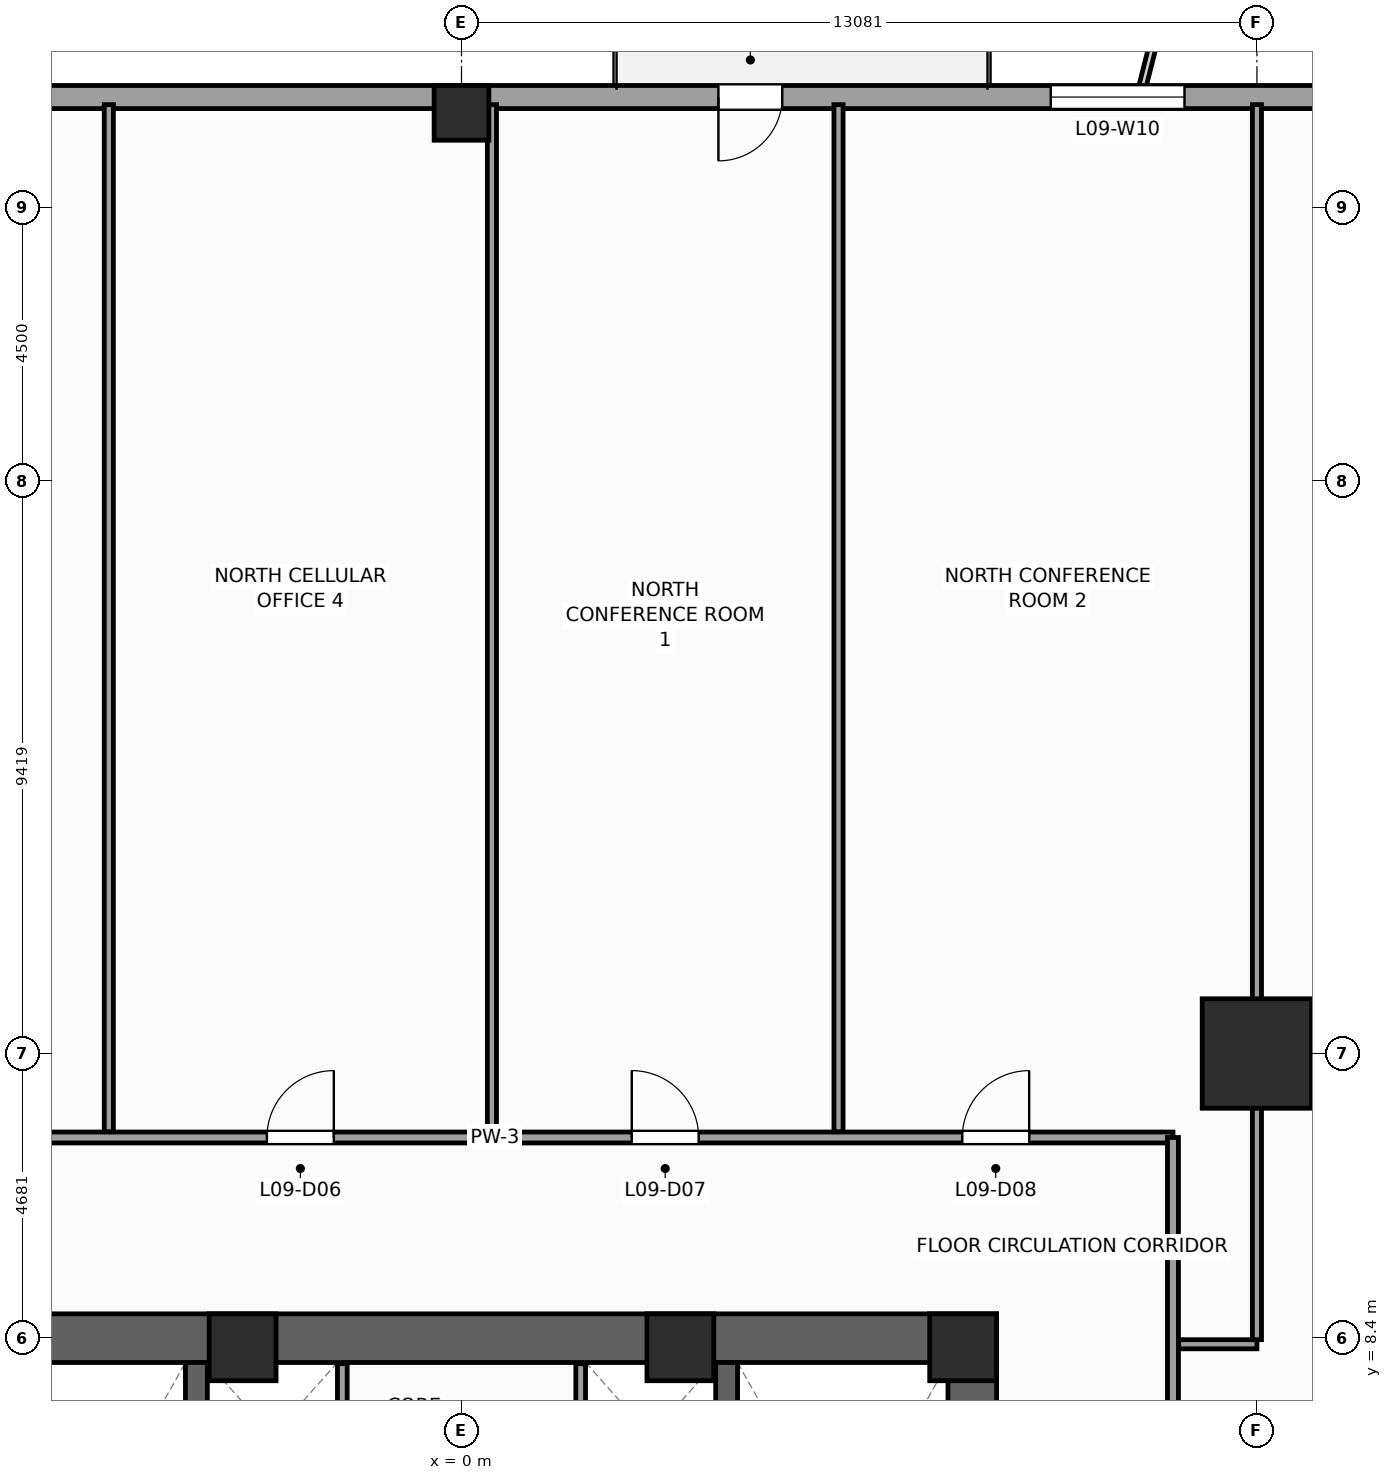
"""IFC4 building model, lengths in metres.
Left out: names, types, materials, properties, quantities, classifications, styles, units other than length and angle.
Written with IfcOpenShell. Run it as: python <this file> out.ifc"""

import sys

from ifc_helpers import new_model, si_unit, direction, frame, frame_2d, origin, origin_2d, place, context, subcontext, project, spatial, rectangle, extrude, source, transform, mapped, element, fill, save


model = new_model("IFC4")
c1 = context("Model", 3, precision=1e-05, world=origin(), true_north=direction((0.0, 1.0)))
c2 = subcontext(c1, "Body", "Model", "MODEL_VIEW")
j1 = project(units=[si_unit("LENGTHUNIT", "METRE"), si_unit("PLANEANGLEUNIT", "RADIAN")], contexts=[c1])
p1 = place(None, origin())
s1 = spatial("IfcSite", under=j1, at=p1, CompositionType="ELEMENT")
p2 = place(p1, origin())
s2 = spatial("IfcBuilding", under=s1, at=p2, CompositionType="ELEMENT")
p3 = place(p2, frame((0.0, 0.0, 42.0)))
s3 = spatial("IfcBuildingStorey", under=s2, at=p3, CompositionType="ELEMENT", Elevation=42.0)
p4 = place(p3, frame((-8.8, 8.4, 0.0), z_axis=(0.0, 0.0, 1.0), x_axis=(1.0, 0.0, 0.0)))
e1 = element("IfcWall", 1, at=p4, inside=s3, PredefinedType="SHEAR", context=c2, shape_type="SweptSolid", body=[
    extrude(rectangle(XDim=17.6, YDim=0.8, at=frame_2d((8.8, 0.0))), origin(), (0.0, 0.0, 1.0), 4.0),
])
p5 = place(p3, frame((8.4, -8.0, 0.0), z_axis=(0.0, 0.0, 1.0), x_axis=(0.0, 1.0, 0.0)))
e2 = element("IfcWall", 2, at=p5, inside=s3, PredefinedType="SHEAR", context=c2, shape_type="SweptSolid", body=[
    extrude(rectangle(XDim=16.0, YDim=0.8, at=frame_2d((8.0, 0.0))), origin(), (0.0, 0.0, 1.0), 4.0),
])
p6 = place(p5, frame((4.69, 0.0, 0.0)))
e3 = element("IfcOpeningElement", 3, at=p6, cuts=e2, PredefinedType="OPENING", context=c2, shape_type="SweptSolid", body=[
    extrude(rectangle(XDim=1.3, YDim=2.2, at=frame_2d((0.65, 1.1))), frame((0.0, 0.41, 0.0), z_axis=(0.0, -1.0, 0.0), x_axis=(1.0, 0.0, 0.0)), (0.0, 0.0, 1.0), 0.82),
])
for number, where, z_axis, x_axis in (
    (4, (-4.36, -8.0, 0.0), (0.0, 0.0, 1.0), (0.0, 1.0, 0.0)),
    (5, (4.36, -8.0, 0.0), (0.0, 0.0, 1.0), (0.0, 1.0, 0.0)),
):
    element("IfcWall", number, at=place(p3, frame(where, z_axis=z_axis, x_axis=x_axis)), inside=s3, PredefinedType="SHEAR", context=c2, shape_type="SweptSolid", body=[
        extrude(rectangle(XDim=16.0, YDim=0.36, at=frame_2d((8.0, 0.0))), origin(), (0.0, 0.0, 1.0), 4.0),
    ])
m1 = source(origin(), c2, "Body", "SweptSolid", [
    extrude(rectangle(XDim=1.1, YDim=1.1, at=origin_2d()), origin(), (0.0, 0.0, 1.0), 4.0),
])
for number, where, z_axis, x_axis in (
    (6, (8.25, 8.25, 0.0), (0.0, 0.0, 1.0), (1.0, 0.0, 0.0)),
    (7, (-3.6, 8.25, 0.0), (0.0, 0.0, 1.0), (1.0, 0.0, 0.0)),
    (8, (3.6, 8.25, 0.0), (0.0, 0.0, 1.0), (1.0, 0.0, 0.0)),
):
    element("IfcColumn", number, at=place(p3, frame(where, z_axis=z_axis, x_axis=x_axis)), inside=s3, PredefinedType="PILASTER", context=c2, shape_type="MappedRepresentation", body=[
        mapped(m1, transform((0.0, 0.0, 0.0), scale=1.0)),
    ])
m2 = source(origin(), c2, "Body", "SweptSolid", [
    extrude(rectangle(XDim=1.8, YDim=1.8, at=origin_2d()), origin(), (0.0, 0.0, 1.0), 4.0),
])
p7 = place(p3, frame((13.081, 13.081, 0.0), z_axis=(0.0, 0.0, 1.0), x_axis=(1.0, 0.0, 0.0)))
e9 = element("IfcColumn", 9, at=p7, inside=s3, PredefinedType="COLUMN", context=c2, shape_type="MappedRepresentation", body=[
    mapped(m2, transform((0.0, 0.0, 0.0), scale=1.0)),
])
m3 = source(origin(), c2, "Body", "SweptSolid", [
    extrude(rectangle(XDim=0.9, YDim=0.9, at=origin_2d()), origin(), (0.0, 0.0, 1.0), 4.0),
])
p8 = place(p3, frame((0.0, 28.55, 0.0), z_axis=(0.0, 0.0, 1.0), x_axis=(1.0, 0.0, 0.0)))
e10 = element("IfcColumn", 10, at=p8, inside=s3, PredefinedType="COLUMN", context=c2, shape_type="MappedRepresentation", body=[
    mapped(m3, transform((0.0, 0.0, 0.0), scale=1.0)),
])
p9 = place(p3, frame((25.69, 28.81, 0.0), z_axis=(0.0, 0.0, 1.0), x_axis=(-1.0, 0.0, 0.0)))
e11 = element("IfcWall", 11, at=p9, inside=s3, PredefinedType="STANDARD", context=c2, shape_type="SweptSolid", body=[
    extrude(rectangle(XDim=51.38, YDim=0.38, at=frame_2d((25.69, 0.0))), origin(), (0.0, 0.0, 1.0), 3.12),
])
p10 = place(p9, frame((20.415, 0.0, 0.0)))
e12 = element("IfcOpeningElement", 12, at=p10, cuts=e11, PredefinedType="OPENING", context=c2, shape_type="SweptSolid", body=[
    extrude(rectangle(XDim=1.05, YDim=2.25, at=frame_2d((0.525, 1.125))), frame((0.0, 0.2, 0.0), z_axis=(0.0, -1.0, 0.0), x_axis=(1.0, 0.0, 0.0)), (0.0, 0.0, 1.0), 0.4),
])
p11 = place(p9, frame((5.466, 0.0, 0.49)))
e13 = element("IfcOpeningElement", 13, at=p11, cuts=e11, PredefinedType="OPENING", context=c2, shape_type="SweptSolid", body=[
    extrude(rectangle(XDim=1.4, YDim=2.4, at=frame_2d((0.7, 1.2))), frame((0.0, 0.2, 0.0), z_axis=(0.0, -1.0, 0.0), x_axis=(1.0, 0.0, 0.0)), (0.0, 0.0, 1.0), 0.4),
])
p12 = place(p9, frame((13.8, 0.0, 0.49)))
e14 = element("IfcOpeningElement", 14, at=p12, cuts=e11, PredefinedType="OPENING", context=c2, shape_type="SweptSolid", body=[
    extrude(rectangle(XDim=2.2, YDim=2.4, at=frame_2d((1.1, 1.2))), frame((0.0, 0.2, 0.0), z_axis=(0.0, -1.0, 0.0), x_axis=(1.0, 0.0, 0.0)), (0.0, 0.0, 1.0), 0.4),
])
p13 = place(p9, frame((33.838, 0.0, 0.49)))
e15 = element("IfcOpeningElement", 15, at=p13, cuts=e11, PredefinedType="OPENING", context=c2, shape_type="SweptSolid", body=[
    extrude(rectangle(XDim=2.2, YDim=2.4, at=frame_2d((1.1, 1.2))), frame((0.0, 0.2, 0.0), z_axis=(0.0, -1.0, 0.0), x_axis=(1.0, 0.0, 0.0)), (0.0, 0.0, 1.0), 0.4),
])
p14 = place(p9, frame((43.487, 0.0, 0.49)))
e16 = element("IfcOpeningElement", 16, at=p14, cuts=e11, PredefinedType="OPENING", context=c2, shape_type="SweptSolid", body=[
    extrude(rectangle(XDim=1.4, YDim=2.4, at=frame_2d((0.7, 1.2))), frame((0.0, 0.2, 0.0), z_axis=(0.0, -1.0, 0.0), x_axis=(1.0, 0.0, 0.0)), (0.0, 0.0, 1.0), 0.4),
])
for number, where, z_axis, x_axis in (
    (17, (-1.96, 4.58, 0.0), (0.0, 0.0, 1.0), (0.0, 1.0, 0.0)),
    (18, (1.96, 4.58, 0.0), (0.0, 0.0, 1.0), (0.0, 1.0, 0.0)),
):
    element("IfcWall", number, at=place(p3, frame(where, z_axis=z_axis, x_axis=x_axis)), inside=s3, PredefinedType="PARTITIONING", context=c2, shape_type="SweptSolid", body=[
        extrude(rectangle(XDim=3.4, YDim=0.16, at=frame_2d((1.7, 0.0))), origin(), (0.0, 0.0, 1.0), 3.72),
    ])
p15 = place(p3, frame((-10.6, 11.7, 0.0), z_axis=(0.0, 0.0, 1.0), x_axis=(1.0, 0.0, 0.0)))
e19 = element("IfcWall", 19, at=p15, inside=s3, PredefinedType="PARTITIONING", context=c2, shape_type="SweptSolid", body=[
    extrude(rectangle(XDim=22.3, YDim=0.18, at=frame_2d((11.15, 0.0))), origin(), (0.0, 0.0, 1.0), 3.72),
])
p16 = place(p15, frame((2.014, 0.0, 0.0)))
e20 = element("IfcOpeningElement", 20, at=p16, cuts=e19, PredefinedType="OPENING", context=c2, shape_type="SweptSolid", body=[
    extrude(rectangle(XDim=1.1, YDim=2.2, at=frame_2d((0.55, 1.1))), frame((0.0, 0.1, 0.0), z_axis=(0.0, -1.0, 0.0), x_axis=(1.0, 0.0, 0.0)), (0.0, 0.0, 1.0), 0.2),
])
p17 = place(p15, frame((7.4, 0.0, 0.0)))
e21 = element("IfcOpeningElement", 21, at=p17, cuts=e19, PredefinedType="OPENING", context=c2, shape_type="SweptSolid", body=[
    extrude(rectangle(XDim=1.1, YDim=2.2, at=frame_2d((0.55, 1.1))), frame((0.0, 0.1, 0.0), z_axis=(0.0, -1.0, 0.0), x_axis=(1.0, 0.0, 0.0)), (0.0, 0.0, 1.0), 0.2),
])
p18 = place(p15, frame((13.4, 0.0, 0.0)))
e22 = element("IfcOpeningElement", 22, at=p18, cuts=e19, PredefinedType="OPENING", context=c2, shape_type="SweptSolid", body=[
    extrude(rectangle(XDim=1.1, YDim=2.2, at=frame_2d((0.55, 1.1))), frame((0.0, 0.1, 0.0), z_axis=(0.0, -1.0, 0.0), x_axis=(1.0, 0.0, 0.0)), (0.0, 0.0, 1.0), 0.2),
])
p19 = place(p15, frame((18.835, 0.0, 0.0)))
e23 = element("IfcOpeningElement", 23, at=p19, cuts=e19, PredefinedType="OPENING", context=c2, shape_type="SweptSolid", body=[
    extrude(rectangle(XDim=1.1, YDim=2.2, at=frame_2d((0.55, 1.1))), frame((0.0, 0.1, 0.0), z_axis=(0.0, -1.0, 0.0), x_axis=(1.0, 0.0, 0.0)), (0.0, 0.0, 1.0), 0.2),
])
p20 = place(p3, frame((11.7, -0.95, 0.0), z_axis=(0.0, 0.0, 1.0), x_axis=(0.0, 1.0, 0.0)))
e24 = element("IfcWall", 24, at=p20, inside=s3, PredefinedType="PARTITIONING", context=c2, shape_type="SweptSolid", body=[
    extrude(rectangle(XDim=12.65, YDim=0.18, at=frame_2d((6.325, 0.0))), origin(), (0.0, 0.0, 1.0), 3.72),
])
p21 = place(p20, frame((6.387, 0.0, 0.0)))
e25 = element("IfcOpeningElement", 25, at=p21, cuts=e24, PredefinedType="OPENING", context=c2, shape_type="SweptSolid", body=[
    extrude(rectangle(XDim=1.1, YDim=2.2, at=frame_2d((0.55, 1.1))), frame((0.0, 0.1, 0.0), z_axis=(0.0, -1.0, 0.0), x_axis=(1.0, 0.0, 0.0)), (0.0, 0.0, 1.0), 0.2),
])
for number, where, z_axis, x_axis in (
    (26, (-5.8, 11.795, 0.0), (0.0, 0.0, 1.0), (0.0, 1.0, 0.0)),
    (27, (0.5, 11.795, 0.0), (0.0, 0.0, 1.0), (0.0, 1.0, 0.0)),
    (28, (6.2, 11.795, 0.0), (0.0, 0.0, 1.0), (0.0, 1.0, 0.0)),
):
    element("IfcWall", number, at=place(p3, frame(where, z_axis=z_axis, x_axis=x_axis)), inside=s3, PredefinedType="PARTITIONING", context=c2, shape_type="SweptSolid", body=[
        extrude(rectangle(XDim=16.89, YDim=0.15, at=frame_2d((8.445, 0.0))), origin(), (0.0, 0.0, 1.0), 3.72),
    ])
p22 = place(p3, frame((11.795, 8.3, 0.0), z_axis=(0.0, 0.0, 1.0), x_axis=(1.0, 0.0, 0.0)))
e29 = element("IfcWall", 29, at=p22, inside=s3, PredefinedType="PARTITIONING", context=c2, shape_type="SweptSolid", body=[
    extrude(rectangle(XDim=1.286, YDim=0.15, at=frame_2d((0.643, 0.0))), origin(), (0.0, 0.0, 1.0), 3.72),
])
p23 = place(p3, frame((13.081, 8.375, 0.0), z_axis=(0.0, 0.0, 1.0), x_axis=(0.0, 1.0, 0.0)))
e30 = element("IfcWall", 30, at=p23, inside=s3, PredefinedType="PARTITIONING", context=c2, shape_type="SweptSolid", body=[
    extrude(rectangle(XDim=20.31, YDim=0.15, at=frame_2d((10.155, 0.0))), origin(), (0.0, 0.0, 1.0), 2.712),
])
m4 = source(origin(), c2, "Body", "SweptSolid", [
    extrude(rectangle(XDim=1.05, YDim=2.25, at=frame_2d((0.525, 1.125))), frame((0.0, 0.025, 0.0), z_axis=(0.0, -1.0, 0.0), x_axis=(1.0, 0.0, 0.0)), (0.0, 0.0, 1.0), 0.05),
])
p24 = place(p10, origin())
e31 = element("IfcDoor", 31, at=p24, inside=s3, OperationType="SINGLE_SWING_RIGHT", PredefinedType="DOOR", context=c2, shape_type="MappedRepresentation", body=[
    mapped(m4, transform((0.0, 0.0, 0.0), scale=1.0)),
])
fill(e12, e31)
m5 = source(origin(), c2, "Body", "SweptSolid", [
    extrude(rectangle(XDim=2.2, YDim=2.4, at=frame_2d((1.1, 1.2))), frame((0.0, 0.03, 0.0), z_axis=(0.0, -1.0, 0.0), x_axis=(1.0, 0.0, 0.0)), (0.0, 0.0, 1.0), 0.06),
])
p25 = place(p12, origin())
e32 = element("IfcWindow", 32, at=p25, inside=s3, PartitioningType="SINGLE_PANEL", PredefinedType="WINDOW", context=c2, shape_type="MappedRepresentation", body=[
    mapped(m5, transform((0.0, 0.0, 0.0), scale=1.0)),
])
fill(e14, e32)
m6 = source(origin(), c2, "Body", "SweptSolid", [
    extrude(rectangle(XDim=1.1, YDim=2.2, at=frame_2d((0.55, 1.1))), frame((0.0, 0.025, 0.0), z_axis=(0.0, -1.0, 0.0), x_axis=(1.0, 0.0, 0.0)), (0.0, 0.0, 1.0), 0.05),
])
p26 = place(p17, origin())
e33 = element("IfcDoor", 33, at=p26, inside=s3, OperationType="SINGLE_SWING_RIGHT", PredefinedType="DOOR", context=c2, shape_type="MappedRepresentation", body=[
    mapped(m6, transform((0.0, 0.0, 0.0), scale=1.0)),
])
fill(e21, e33)
p27 = place(p18, origin())
e34 = element("IfcDoor", 34, at=p27, inside=s3, OperationType="SINGLE_SWING_LEFT", PredefinedType="DOOR", context=c2, shape_type="MappedRepresentation", body=[
    mapped(m6, transform((0.0, 0.0, 0.0), scale=1.0)),
])
fill(e22, e34)
p28 = place(p19, origin())
e35 = element("IfcDoor", 35, at=p28, inside=s3, OperationType="SINGLE_SWING_RIGHT", PredefinedType="DOOR", context=c2, shape_type="MappedRepresentation", body=[
    mapped(m6, transform((0.0, 0.0, 0.0), scale=1.0)),
])
fill(e23, e35)
save(model, sys.argv[1])
